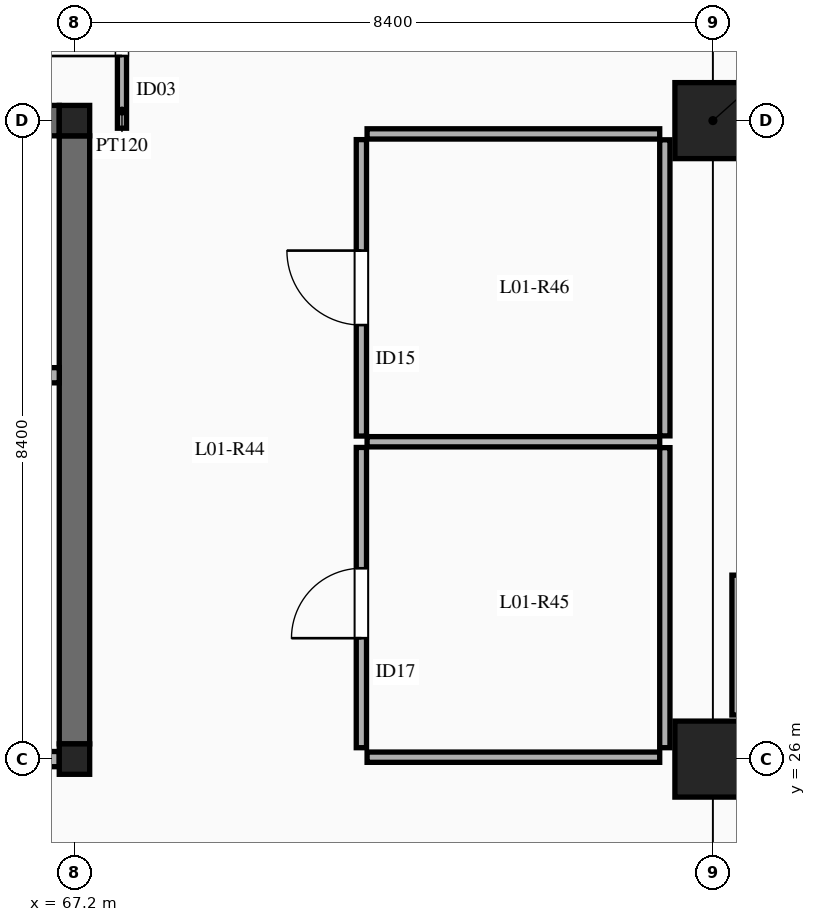
"""IFC4 building model, lengths in metres.
Left out: names, types, materials, properties, quantities, classifications, styles, units other than length and angle.
Written with IfcOpenShell. Run it as: python <this file> out.ifc"""

import sys

from ifc_helpers import new_model, si_unit, direction, frame, frame_2d, origin, origin_2d, place, context, subcontext, project, spatial, rectangle, extrude, element, fill, save


model = new_model("IFC4")
c1 = context("Model", 3, precision=1e-05, world=origin(), true_north=direction((0.0, 1.0)))
c2 = subcontext(c1, "Body", "Model", "MODEL_VIEW")
j1 = project(units=[si_unit("LENGTHUNIT", "METRE"), si_unit("PLANEANGLEUNIT", "RADIAN")], contexts=[c1])
p1 = place(None, origin())
s1 = spatial("IfcSite", under=j1, at=p1, CompositionType="ELEMENT")
p2 = place(p1, origin())
s2 = spatial("IfcBuilding", under=s1, at=p2, CompositionType="ELEMENT")
p3 = place(p2, frame((0.0, 0.0, 5.4)))
s3 = spatial("IfcBuildingStorey", under=s2, at=p3, CompositionType="ELEMENT", Elevation=5.4)
for number, where, z_axis, x_axis in (
    (1, (67.2, 26.0, 0.0), (0.0, 0.0, 1.0), (1.0, 0.0, 0.0)),
    (2, (67.2, 34.4, 0.0), (0.0, 0.0, 1.0), (1.0, 0.0, 0.0)),
):
    element("IfcColumn", number, at=place(p3, frame(where, z_axis=z_axis, x_axis=x_axis)), inside=s3, PredefinedType="COLUMN", context=c2, shape_type="SweptSolid", body=[
        extrude(rectangle(XDim=0.4, YDim=0.4, at=origin_2d()), origin(), (0.0, 0.0, 1.0), 4.8),
    ])
for number, where, z_axis, x_axis in (
    (3, (75.6, 26.0, 0.0), (0.0, 0.0, 1.0), (1.0, 0.0, 0.0)),
    (4, (75.6, 34.4, 0.0), (0.0, 0.0, 1.0), (1.0, 0.0, 0.0)),
):
    element("IfcColumn", number, at=place(p3, frame(where, z_axis=z_axis, x_axis=x_axis)), inside=s3, PredefinedType="COLUMN", context=c2, shape_type="SweptSolid", body=[
        extrude(rectangle(XDim=1.0, YDim=1.0, at=origin_2d()), origin(), (0.0, 0.0, 1.0), 4.8),
    ])
for number, where, z_axis, x_axis in (
    (5, (67.2, 26.2, 0.0), (0.0, 0.0, 1.0), (0.0, 1.0, 0.0)),
    (6, (59.0, 34.4, 0.0), (0.0, 0.0, 1.0), (1.0, 0.0, 0.0)),
):
    element("IfcWall", number, at=place(p3, frame(where, z_axis=z_axis, x_axis=x_axis)), inside=s3, PredefinedType="SHEAR", context=c2, shape_type="SweptSolid", body=[
        extrude(rectangle(XDim=8.0, YDim=0.4, at=frame_2d((4.0, 0.0))), origin(), (0.0, 0.0, 1.0), 4.8),
    ])
p4 = place(p3, frame((59.0, 26.0, 0.0), z_axis=(0.0, 0.0, 1.0), x_axis=(1.0, 0.0, 0.0)))
e7 = element("IfcWall", 7, at=p4, inside=s3, PredefinedType="SOLIDWALL", context=c2, shape_type="SweptSolid", body=[
    extrude(rectangle(XDim=8.0, YDim=0.2, at=frame_2d((4.0, 0.0))), origin(), (0.0, 0.0, 1.0), 3.88),
])
p5 = place(p4, frame((1.55, 0.0, 0.0)))
e8 = element("IfcOpeningElement", 8, at=p5, cuts=e7, PredefinedType="OPENING", context=c2, shape_type="SweptSolid", body=[
    extrude(rectangle(XDim=1.15, YDim=2.15, at=frame_2d((0.575, 1.075))), frame((0.0, 0.11, 0.0), z_axis=(0.0, -1.0, 0.0), x_axis=(1.0, 0.0, 0.0)), (0.0, 0.0, 1.0), 0.22),
])
p6 = place(p4, frame((5.35, 0.0, 0.0)))
e9 = element("IfcOpeningElement", 9, at=p6, cuts=e7, PredefinedType="OPENING", context=c2, shape_type="SweptSolid", body=[
    extrude(rectangle(XDim=1.22, YDim=2.15, at=frame_2d((0.61, 1.075))), frame((0.0, 0.11, 0.0), z_axis=(0.0, -1.0, 0.0), x_axis=(1.0, 0.0, 0.0)), (0.0, 0.0, 1.0), 0.22),
])
p7 = place(p3, frame((63.05, 31.05, 0.0), z_axis=(0.0, 0.0, 1.0), x_axis=(1.0, 0.0, 0.0)))
e10 = element("IfcWall", 10, at=p7, inside=s3, PredefinedType="SOLIDWALL", context=c2, shape_type="SweptSolid", body=[
    extrude(rectangle(XDim=3.95, YDim=0.2, at=frame_2d((1.975, 0.0))), origin(), (0.0, 0.0, 1.0), 4.58),
])
p8 = place(p7, frame((1.4, 0.0, 0.0)))
e11 = element("IfcOpeningElement", 11, at=p8, cuts=e10, PredefinedType="OPENING", context=c2, shape_type="SweptSolid", body=[
    extrude(rectangle(XDim=1.1, YDim=2.15, at=frame_2d((0.55, 1.075))), frame((0.0, 0.11, 0.0), z_axis=(0.0, -1.0, 0.0), x_axis=(1.0, 0.0, 0.0)), (0.0, 0.0, 1.0), 0.22),
])
p9 = place(p3, frame((75.95, 26.58, 0.0), z_axis=(0.0, 0.0, 1.0), x_axis=(0.0, 1.0, 0.0)))
e12 = element("IfcWall", 12, at=p9, inside=s3, PredefinedType="SOLIDWALL", context=c2, shape_type="SweptSolid", body=[
    extrude(rectangle(XDim=1.84, YDim=0.2, at=frame_2d((0.92, 0.0))), origin(), (0.0, 0.0, 1.0), 3.93),
])
p10 = place(p3, frame((70.975, 26.15, 0.0), z_axis=(0.0, 0.0, 1.0), x_axis=(0.0, 1.0, 0.0)))
e13 = element("IfcWall", 13, at=p10, inside=s3, PredefinedType="PARTITIONING", context=c2, shape_type="SweptSolid", body=[
    extrude(rectangle(XDim=3.95, YDim=0.135, at=frame_2d((1.975, 0.0))), origin(), (0.0, 0.0, 1.0), 2.95),
])
p11 = place(p10, frame((1.441, 0.0, 0.0)))
e14 = element("IfcOpeningElement", 14, at=p11, cuts=e13, PredefinedType="OPENING", context=c2, shape_type="SweptSolid", body=[
    extrude(rectangle(XDim=0.92, YDim=2.12, at=frame_2d((0.46, 1.06))), frame((0.0, 0.077, 0.0), z_axis=(0.0, -1.0, 0.0), x_axis=(1.0, 0.0, 0.0)), (0.0, 0.0, 1.0), 0.155),
])
p12 = place(p3, frame((70.975, 30.25, 0.0), z_axis=(0.0, 0.0, 1.0), x_axis=(0.0, 1.0, 0.0)))
e15 = element("IfcWall", 15, at=p12, inside=s3, PredefinedType="PARTITIONING", context=c2, shape_type="SweptSolid", body=[
    extrude(rectangle(XDim=3.9, YDim=0.135, at=frame_2d((1.95, 0.0))), origin(), (0.0, 0.0, 1.0), 2.95),
])
p13 = place(p12, frame((1.46, 0.0, 0.0)))
e16 = element("IfcOpeningElement", 16, at=p13, cuts=e15, PredefinedType="OPENING", context=c2, shape_type="SweptSolid", body=[
    extrude(rectangle(XDim=0.98, YDim=2.15, at=frame_2d((0.49, 1.075))), frame((0.0, 0.077, 0.0), z_axis=(0.0, -1.0, 0.0), x_axis=(1.0, 0.0, 0.0)), (0.0, 0.0, 1.0), 0.155),
])
for number, where, z_axis, x_axis in (
    (17, (71.05, 30.175, 0.0), (0.0, 0.0, 1.0), (1.0, 0.0, 0.0)),
    (18, (71.05, 26.025, 0.0), (0.0, 0.0, 1.0), (1.0, 0.0, 0.0)),
    (19, (71.05, 34.225, 0.0), (0.0, 0.0, 1.0), (1.0, 0.0, 0.0)),
):
    element("IfcWall", number, at=place(p3, frame(where, z_axis=z_axis, x_axis=x_axis)), inside=s3, PredefinedType="PARTITIONING", context=c2, shape_type="SweptSolid", body=[
        extrude(rectangle(XDim=3.85, YDim=0.135, at=frame_2d((1.925, 0.0))), origin(), (0.0, 0.0, 1.0), 2.95),
    ])
p14 = place(p3, frame((67.825, 34.3, 0.0), z_axis=(0.0, 0.0, 1.0), x_axis=(0.0, 1.0, 0.0)))
e20 = element("IfcWall", 20, at=p14, inside=s3, PredefinedType="PARTITIONING", context=c2, shape_type="SweptSolid", body=[
    extrude(rectangle(XDim=2.8, YDim=0.12, at=frame_2d((1.4, 0.0))), origin(), (0.0, 0.0, 1.0), 2.95),
])
p15 = place(p14, frame((0.95, 0.0, 0.0)))
e21 = element("IfcOpeningElement", 21, at=p15, cuts=e20, PredefinedType="OPENING", context=c2, shape_type="SweptSolid", body=[
    extrude(rectangle(XDim=1.6, YDim=2.35, at=frame_2d((0.8, 1.175))), frame((0.0, 0.07, 0.0), z_axis=(0.0, -1.0, 0.0), x_axis=(1.0, 0.0, 0.0)), (0.0, 0.0, 1.0), 0.14),
])
p16 = place(p3, frame((74.968, 26.15, 0.0), z_axis=(0.0, 0.0, 1.0), x_axis=(0.0, 1.0, 0.0)))
e22 = element("IfcWall", 22, at=p16, inside=s3, PredefinedType="PARTITIONING", context=c2, shape_type="SweptSolid", body=[
    extrude(rectangle(XDim=3.948, YDim=0.135, at=frame_2d((1.974, 0.0))), origin(), (0.0, 0.0, 1.0), 2.95),
])
p17 = place(p3, frame((74.968, 30.252, 0.0), z_axis=(0.0, 0.0, 1.0), x_axis=(0.0, 1.0, 0.0)))
e23 = element("IfcWall", 23, at=p17, inside=s3, PredefinedType="PARTITIONING", context=c2, shape_type="SweptSolid", body=[
    extrude(rectangle(XDim=3.895, YDim=0.135, at=frame_2d((1.948, 0.0))), origin(), (0.0, 0.0, 1.0), 2.95),
])
p18 = place(p11, origin())
e24 = element("IfcDoor", 24, at=p18, inside=s3, OperationType="SINGLE_SWING_LEFT", PredefinedType="DOOR", context=c2, shape_type="SweptSolid", body=[
    extrude(rectangle(XDim=0.92, YDim=2.12, at=frame_2d((0.46, 1.06))), frame((0.0, 0.025, 0.0), z_axis=(0.0, -1.0, 0.0), x_axis=(1.0, 0.0, 0.0)), (0.0, 0.0, 1.0), 0.05),
])
fill(e14, e24)
p19 = place(p13, origin())
e25 = element("IfcDoor", 25, at=p19, inside=s3, OperationType="SINGLE_SWING_RIGHT", PredefinedType="DOOR", context=c2, shape_type="SweptSolid", body=[
    extrude(rectangle(XDim=0.98, YDim=2.15, at=frame_2d((0.49, 1.075))), frame((0.0, 0.025, 0.0), z_axis=(0.0, -1.0, 0.0), x_axis=(1.0, 0.0, 0.0)), (0.0, 0.0, 1.0), 0.05),
])
fill(e16, e25)
p20 = place(p15, origin())
e26 = element("IfcDoor", 26, at=p20, inside=s3, OperationType="SINGLE_SWING_LEFT", PredefinedType="DOOR", context=c2, shape_type="SweptSolid", body=[
    extrude(rectangle(XDim=1.6, YDim=2.35, at=frame_2d((0.8, 1.175))), frame((0.0, 0.025, 0.0), z_axis=(0.0, -1.0, 0.0), x_axis=(1.0, 0.0, 0.0)), (0.0, 0.0, 1.0), 0.05),
])
fill(e21, e26)
save(model, sys.argv[1])
